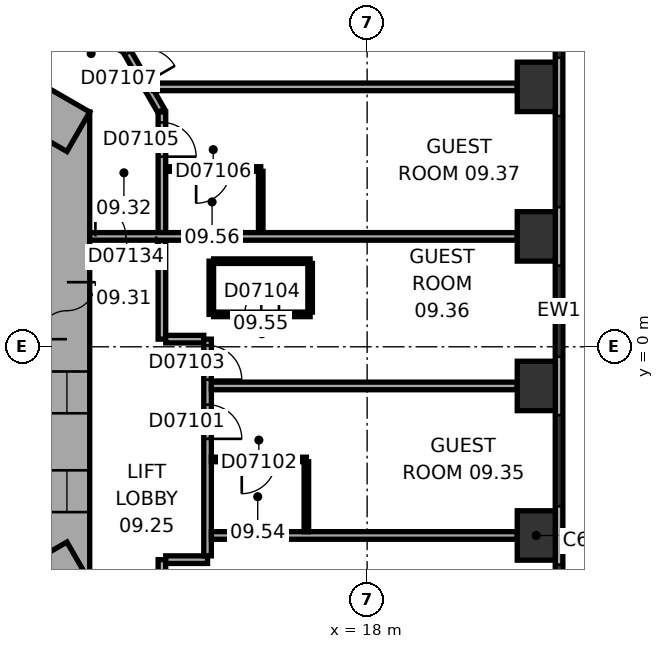
"""IFC4 building model, lengths in metres.
Left out: names, types, materials, properties, quantities, classifications, styles, units other than length and angle.
Written with IfcOpenShell. Run it as: python <this file> out.ifc"""

import sys

from ifc_helpers import new_model, si_unit, direction, frame, frame_2d, origin, origin_2d, place, context, subcontext, project, spatial, rectangle, extrude, element, fill, save


model = new_model("IFC4")
c1 = context("Model", 3, precision=1e-05, world=origin(), true_north=direction((0.0, 1.0)))
c2 = subcontext(c1, "Body", "Model", "MODEL_VIEW")
j1 = project(units=[si_unit("LENGTHUNIT", "METRE"), si_unit("PLANEANGLEUNIT", "RADIAN")], contexts=[c1])
p1 = place(None, origin())
s1 = spatial("IfcSite", under=j1, at=p1, CompositionType="ELEMENT")
p2 = place(p1, origin())
s2 = spatial("IfcBuilding", under=s1, at=p2, CompositionType="ELEMENT")
p3 = place(p2, frame((0.0, 0.0, 50.6)))
s3 = spatial("IfcBuildingStorey", under=s2, at=p3, CompositionType="ELEMENT", Elevation=50.6)
for number, where, z_axis, x_axis in (
    (1, (22.45, -4.965, 0.0), (0.0, 0.0, 1.0), (0.0, 1.0, 0.0)),
    (2, (22.45, -1.03, 0.0), (0.0, 0.0, 1.0), (0.0, 1.0, 0.0)),
    (3, (22.45, 2.905, 0.0), (0.0, 0.0, 1.0), (0.0, 1.0, 0.0)),
    (4, (22.45, 6.839, 0.0), (0.0, 0.0, 1.0), (0.0, 1.0, 0.0)),
):
    element("IfcColumn", number, at=place(p3, frame(where, z_axis=z_axis, x_axis=x_axis)), inside=s3, PredefinedType="COLUMN", context=c2, shape_type="SweptSolid", body=[
        extrude(rectangle(XDim=1.3, YDim=1.0, at=origin_2d()), origin(), (0.0, 0.0, 1.0), 3.3),
    ])
p4 = place(p3, frame((10.1, -6.177, 0.0), z_axis=(0.0, 0.0, 1.0), x_axis=(0.0, 1.0, 0.0)))
e5 = element("IfcWall", 5, at=p4, inside=s3, PredefinedType="SHEAR", context=c2, shape_type="SweptSolid", body=[
    extrude(rectangle(XDim=12.355, YDim=1.2, at=frame_2d((6.177, 0.0))), origin(), (0.0, 0.0, 1.0), 3.3),
])
p5 = place(p4, frame((6.378, 0.0, 0.0)))
e6 = element("IfcOpeningElement", 6, at=p5, cuts=e5, PredefinedType="OPENING", context=c2, shape_type="SweptSolid", body=[
    extrude(rectangle(XDim=1.5, YDim=2.1, at=frame_2d((0.75, 1.05))), frame((0.0, 0.61, 0.0), z_axis=(0.0, -1.0, 0.0), x_axis=(1.0, 0.0, 0.0)), (0.0, 0.0, 1.0), 1.22),
])
p6 = place(p4, frame((1.828, 0.0, 0.0)))
e7 = element("IfcOpeningElement", 7, at=p6, cuts=e5, PredefinedType="OPENING", context=c2, shape_type="SweptSolid", body=[
    extrude(rectangle(XDim=1.1, YDim=2.1, at=frame_2d((0.55, 1.05))), frame((0.0, 0.61, 0.0), z_axis=(0.0, -1.0, 0.0), x_axis=(1.0, 0.0, 0.0)), (0.0, 0.0, 1.0), 1.22),
])
p7 = place(p4, frame((4.427, 0.0, 0.0)))
e8 = element("IfcOpeningElement", 8, at=p7, cuts=e5, PredefinedType="OPENING", context=c2, shape_type="SweptSolid", body=[
    extrude(rectangle(XDim=1.1, YDim=2.1, at=frame_2d((0.55, 1.05))), frame((0.0, 0.61, 0.0), z_axis=(0.0, -1.0, 0.0), x_axis=(1.0, 0.0, 0.0)), (0.0, 0.0, 1.0), 1.22),
])
p8 = place(p3, frame((10.4, 5.658, 0.0), z_axis=(0.0, 0.0, 1.0), x_axis=(-0.866021384402, 0.500006961711, 0.0)))
e9 = element("IfcWall", 9, at=p8, inside=s3, PredefinedType="SHEAR", context=c2, shape_type="SweptSolid", body=[
    extrude(rectangle(XDim=12.355, YDim=1.2, at=frame_2d((6.178, 0.0))), origin(), (0.0, 0.0, 1.0), 3.3),
])
p9 = place(p8, frame((2.728, 0.0, 0.0)))
e10 = element("IfcOpeningElement", 10, at=p9, cuts=e9, PredefinedType="OPENING", context=c2, shape_type="SweptSolid", body=[
    extrude(rectangle(XDim=1.1, YDim=2.1, at=frame_2d((0.55, 1.05))), frame((0.0, 0.61, 0.0), z_axis=(0.0, -1.0, 0.0), x_axis=(1.0, 0.0, 0.0)), (0.0, 0.0, 1.0), 1.22),
])
p10 = place(p8, frame((5.328, 0.0, 0.0)))
e11 = element("IfcOpeningElement", 11, at=p10, cuts=e9, PredefinedType="OPENING", context=c2, shape_type="SweptSolid", body=[
    extrude(rectangle(XDim=1.1, YDim=2.1, at=frame_2d((0.55, 1.05))), frame((0.0, 0.61, 0.0), z_axis=(0.0, -1.0, 0.0), x_axis=(1.0, 0.0, 0.0)), (0.0, 0.0, 1.0), 1.22),
])
p11 = place(p8, frame((7.928, 0.0, 0.0)))
e12 = element("IfcOpeningElement", 12, at=p11, cuts=e9, PredefinedType="OPENING", context=c2, shape_type="SweptSolid", body=[
    extrude(rectangle(XDim=1.1, YDim=2.1, at=frame_2d((0.55, 1.05))), frame((0.0, 0.61, 0.0), z_axis=(0.0, -1.0, 0.0), x_axis=(1.0, 0.0, 0.0)), (0.0, 0.0, 1.0), 1.22),
])
p12 = place(p3, frame((-0.3, -11.836, 0.0), z_axis=(0.0, 0.0, 1.0), x_axis=(0.866021384402, 0.500006961711, 0.0)))
e13 = element("IfcWall", 13, at=p12, inside=s3, PredefinedType="SHEAR", context=c2, shape_type="SweptSolid", body=[
    extrude(rectangle(XDim=12.355, YDim=1.2, at=frame_2d((6.178, 0.0))), origin(), (0.0, 0.0, 1.0), 3.3),
])
p13 = place(p12, frame((2.828, 0.0, 0.0)))
e14 = element("IfcOpeningElement", 14, at=p13, cuts=e13, PredefinedType="OPENING", context=c2, shape_type="SweptSolid", body=[
    extrude(rectangle(XDim=0.9, YDim=2.1, at=frame_2d((0.45, 1.05))), frame((0.0, 0.61, 0.0), z_axis=(0.0, -1.0, 0.0), x_axis=(1.0, 0.0, 0.0)), (0.0, 0.0, 1.0), 1.22),
])
p14 = place(p12, frame((5.428, 0.0, 0.0)))
e15 = element("IfcOpeningElement", 15, at=p14, cuts=e13, PredefinedType="OPENING", context=c2, shape_type="SweptSolid", body=[
    extrude(rectangle(XDim=0.9, YDim=2.1, at=frame_2d((0.45, 1.05))), frame((0.0, 0.61, 0.0), z_axis=(0.0, -1.0, 0.0), x_axis=(1.0, 0.0, 0.0)), (0.0, 0.0, 1.0), 1.22),
])
p15 = place(p12, frame((7.928, 0.0, 0.0)))
e16 = element("IfcOpeningElement", 16, at=p15, cuts=e13, PredefinedType="OPENING", context=c2, shape_type="SweptSolid", body=[
    extrude(rectangle(XDim=1.1, YDim=2.1, at=frame_2d((0.55, 1.05))), frame((0.0, 0.61, 0.0), z_axis=(0.0, -1.0, 0.0), x_axis=(1.0, 0.0, 0.0)), (0.0, 0.0, 1.0), 1.22),
])
p16 = place(p3, frame((23.05, -9.687, 0.0), z_axis=(0.0, 0.0, 1.0), x_axis=(0.0, 1.0, 0.0)))
e17 = element("IfcWall", 17, at=p16, inside=s3, PredefinedType="STANDARD", context=c2, shape_type="SweptSolid", body=[
    extrude(rectangle(XDim=21.246, YDim=0.2, at=frame_2d((10.623, 0.0))), origin(), (0.0, 0.0, 1.0), 3.3),
])
p17 = place(p16, frame((1.555, 0.0, 0.8)))
e18 = element("IfcOpeningElement", 18, at=p17, cuts=e17, PredefinedType="OPENING", context=c2, shape_type="SweptSolid", body=[
    extrude(rectangle(XDim=2.4, YDim=1.7, at=frame_2d((1.2, 0.85))), frame((0.0, 0.11, 0.0), z_axis=(0.0, -1.0, 0.0), x_axis=(1.0, 0.0, 0.0)), (0.0, 0.0, 1.0), 0.22),
])
p18 = place(p16, frame((5.489, 0.0, 0.8)))
e19 = element("IfcOpeningElement", 19, at=p18, cuts=e17, PredefinedType="OPENING", context=c2, shape_type="SweptSolid", body=[
    extrude(rectangle(XDim=2.4, YDim=1.7, at=frame_2d((1.2, 0.85))), frame((0.0, 0.11, 0.0), z_axis=(0.0, -1.0, 0.0), x_axis=(1.0, 0.0, 0.0)), (0.0, 0.0, 1.0), 0.22),
])
p19 = place(p16, frame((9.424, 0.0, 0.8)))
e20 = element("IfcOpeningElement", 20, at=p19, cuts=e17, PredefinedType="OPENING", context=c2, shape_type="SweptSolid", body=[
    extrude(rectangle(XDim=2.4, YDim=1.7, at=frame_2d((1.2, 0.85))), frame((0.0, 0.11, 0.0), z_axis=(0.0, -1.0, 0.0), x_axis=(1.0, 0.0, 0.0)), (0.0, 0.0, 1.0), 0.22),
])
p20 = place(p16, frame((13.358, 0.0, 0.8)))
e21 = element("IfcOpeningElement", 21, at=p20, cuts=e17, PredefinedType="OPENING", context=c2, shape_type="SweptSolid", body=[
    extrude(rectangle(XDim=2.4, YDim=1.7, at=frame_2d((1.2, 0.85))), frame((0.0, 0.11, 0.0), z_axis=(0.0, -1.0, 0.0), x_axis=(1.0, 0.0, 0.0)), (0.0, 0.0, 1.0), 0.22),
])
p21 = place(p16, frame((17.293, 0.0, 0.8)))
e22 = element("IfcOpeningElement", 22, at=p21, cuts=e17, PredefinedType="OPENING", context=c2, shape_type="SweptSolid", body=[
    extrude(rectangle(XDim=2.4, YDim=1.7, at=frame_2d((1.2, 0.85))), frame((0.0, 0.11, 0.0), z_axis=(0.0, -1.0, 0.0), x_axis=(1.0, 0.0, 0.0)), (0.0, 0.0, 1.0), 0.22),
])
p22 = place(p3, frame((12.58, 6.212, 0.0), z_axis=(0.0, 0.0, 1.0), x_axis=(-0.500063286585, 0.865988862174, 0.0)))
e23 = element("IfcWall", 23, at=p22, inside=s3, PredefinedType="PARTITIONING", context=c2, shape_type="SweptSolid", body=[
    extrude(rectangle(XDim=1.86, YDim=0.2, at=frame_2d((0.93, 0.0))), origin(), (0.0, 0.0, 1.0), 3.05),
])
p23 = place(p22, frame((0.842, 0.0, 0.0)))
e24 = element("IfcOpeningElement", 24, at=p23, cuts=e23, PredefinedType="OPENING", context=c2, shape_type="SweptSolid", body=[
    extrude(rectangle(XDim=0.9, YDim=2.1, at=frame_2d((0.45, 1.05))), frame((0.0, 0.11, 0.0), z_axis=(0.0, -1.0, 0.0), x_axis=(1.0, 0.0, 0.0)), (0.0, 0.0, 1.0), 0.22),
])
p24 = place(p3, frame((12.6, -6.138, 0.0), z_axis=(0.0, 0.0, 1.0), x_axis=(0.0, 1.0, 0.0)))
e25 = element("IfcWall", 25, at=p24, inside=s3, PredefinedType="PARTITIONING", context=c2, shape_type="SweptSolid", body=[
    extrude(rectangle(XDim=0.537, YDim=0.2, at=frame_2d((0.268, 0.0))), origin(), (0.0, 0.0, 1.0), 3.05),
])
p25 = place(p3, frame((12.6, 0.201, 0.0), z_axis=(0.0, 0.0, 1.0), x_axis=(0.0, 1.0, 0.0)))
e26 = element("IfcWall", 26, at=p25, inside=s3, PredefinedType="PARTITIONING", context=c2, shape_type="SweptSolid", body=[
    extrude(rectangle(XDim=2.604, YDim=0.2, at=frame_2d((1.302, 0.0))), origin(), (0.0, 0.0, 1.0), 3.05),
])
p26 = place(p3, frame((12.6, 3.004, 0.0), z_axis=(0.0, 0.0, 1.0), x_axis=(0.0, 1.0, 0.0)))
e27 = element("IfcWall", 27, at=p26, inside=s3, PredefinedType="PARTITIONING", context=c2, shape_type="SweptSolid", body=[
    extrude(rectangle(XDim=3.173, YDim=0.2, at=frame_2d((1.586, 0.0))), origin(), (0.0, 0.0, 1.0), 3.05),
])
p27 = place(p26, frame((1.998, 0.0, 0.0)))
e28 = element("IfcOpeningElement", 28, at=p27, cuts=e27, PredefinedType="OPENING", context=c2, shape_type="SweptSolid", body=[
    extrude(rectangle(XDim=0.9, YDim=2.1, at=frame_2d((0.45, 1.05))), frame((0.0, 0.11, 0.0), z_axis=(0.0, -1.0, 0.0), x_axis=(1.0, 0.0, 0.0)), (0.0, 0.0, 1.0), 0.22),
])
p28 = place(p3, frame((12.7, -5.601, 0.0), z_axis=(0.0, 0.0, 1.0), x_axis=(1.0, 0.0, 0.0)))
e29 = element("IfcWall", 29, at=p28, inside=s3, PredefinedType="PARTITIONING", context=c2, shape_type="SweptSolid", body=[
    extrude(rectangle(XDim=1.101, YDim=0.2, at=frame_2d((0.551, 0.0))), origin(), (0.0, 0.0, 1.0), 3.05),
])
p29 = place(p3, frame((12.7, 4.677, 0.0), z_axis=(0.0, 0.0, 1.0), x_axis=(1.0, 0.0, 0.0)))
e30 = element("IfcWall", 30, at=p29, inside=s3, PredefinedType="PARTITIONING", context=c2, shape_type="SweptSolid", body=[
    extrude(rectangle(XDim=2.5, YDim=0.12, at=frame_2d((1.25, 0.0))), origin(), (0.0, 0.0, 1.0), 3.05),
])
p30 = place(p29, frame((0.8, 0.0, 0.0)))
e31 = element("IfcOpeningElement", 31, at=p30, cuts=e30, PredefinedType="OPENING", context=c2, shape_type="SweptSolid", body=[
    extrude(rectangle(XDim=0.9, YDim=2.1, at=frame_2d((0.45, 1.05))), frame((0.0, 0.07, 0.0), z_axis=(0.0, -1.0, 0.0), x_axis=(1.0, 0.0, 0.0)), (0.0, 0.0, 1.0), 0.14),
])
p31 = place(p3, frame((13.701, 0.201, 0.0), z_axis=(0.0, 0.0, 1.0), x_axis=(-1.0, 0.0, 0.0)))
e32 = element("IfcWall", 32, at=p31, inside=s3, PredefinedType="PARTITIONING", context=c2, shape_type="SweptSolid", body=[
    extrude(rectangle(XDim=1.001, YDim=0.2, at=frame_2d((0.5, 0.0))), origin(), (0.0, 0.0, 1.0), 3.05),
])
p32 = place(p3, frame((13.801, -5.501, 0.0), z_axis=(0.0, 0.0, 1.0), x_axis=(0.0, 1.0, 0.0)))
e33 = element("IfcWall", 33, at=p32, inside=s3, PredefinedType="PARTITIONING", context=c2, shape_type="SweptSolid", body=[
    extrude(rectangle(XDim=5.702, YDim=0.2, at=frame_2d((2.851, 0.0))), origin(), (0.0, 0.0, 1.0), 3.05),
])
p33 = place(p32, frame((3.079, 0.0, 0.0)))
e34 = element("IfcOpeningElement", 34, at=p33, cuts=e33, PredefinedType="OPENING", context=c2, shape_type="SweptSolid", body=[
    extrude(rectangle(XDim=0.9, YDim=2.1, at=frame_2d((0.45, 1.05))), frame((0.0, 0.11, 0.0), z_axis=(0.0, -1.0, 0.0), x_axis=(1.0, 0.0, 0.0)), (0.0, 0.0, 1.0), 0.22),
])
p34 = place(p32, frame((4.636, 0.0, 0.0)))
e35 = element("IfcOpeningElement", 35, at=p34, cuts=e33, PredefinedType="OPENING", context=c2, shape_type="SweptSolid", body=[
    extrude(rectangle(XDim=0.9, YDim=2.1, at=frame_2d((0.45, 1.05))), frame((0.0, 0.11, 0.0), z_axis=(0.0, -1.0, 0.0), x_axis=(1.0, 0.0, 0.0)), (0.0, 0.0, 1.0), 0.22),
])
p35 = place(p3, frame((13.901, -4.965, 0.0), z_axis=(0.0, 0.0, 1.0), x_axis=(1.0, 0.0, 0.0)))
e36 = element("IfcWall", 36, at=p35, inside=s3, PredefinedType="PARTITIONING", context=c2, shape_type="SweptSolid", body=[
    extrude(rectangle(XDim=8.049, YDim=0.2, at=frame_2d((4.024, 0.0))), origin(), (0.0, 0.0, 1.0), 3.05),
])
p36 = place(p3, frame((13.901, -2.965, 0.0), z_axis=(0.0, 0.0, 1.0), x_axis=(1.0, 0.0, 0.0)))
e37 = element("IfcWall", 37, at=p36, inside=s3, PredefinedType="PARTITIONING", context=c2, shape_type="SweptSolid", body=[
    extrude(rectangle(XDim=2.5, YDim=0.12, at=frame_2d((1.25, 0.0))), origin(), (0.0, 0.0, 1.0), 3.05),
])
p37 = place(p36, frame((0.8, 0.0, 0.0)))
e38 = element("IfcOpeningElement", 38, at=p37, cuts=e37, PredefinedType="OPENING", context=c2, shape_type="SweptSolid", body=[
    extrude(rectangle(XDim=0.9, YDim=2.1, at=frame_2d((0.45, 1.05))), frame((0.0, 0.07, 0.0), z_axis=(0.0, -1.0, 0.0), x_axis=(1.0, 0.0, 0.0)), (0.0, 0.0, 1.0), 0.14),
])
p38 = place(p3, frame((13.9, 0.853, 0.0), z_axis=(0.0, 0.0, 1.0), x_axis=(0.0, 1.0, 0.0)))
e39 = element("IfcWall", 39, at=p38, inside=s3, PredefinedType="PARTITIONING", context=c2, shape_type="SweptSolid", body=[
    extrude(rectangle(XDim=1.4, YDim=0.12, at=frame_2d((0.7, 0.0))), origin(), (0.0, 0.0, 1.0), 3.05),
])
p39 = place(p3, frame((13.96, 2.253, 0.0), z_axis=(0.0, 0.0, 1.0), x_axis=(1.0, 0.0, 0.0)))
e40 = element("IfcWall", 40, at=p39, inside=s3, PredefinedType="PARTITIONING", context=c2, shape_type="SweptSolid", body=[
    extrude(rectangle(XDim=2.54, YDim=0.12, at=frame_2d((1.27, 0.0))), origin(), (0.0, 0.0, 1.0), 3.05),
])
p40 = place(p3, frame((15.2, 4.618, 0.0), z_axis=(0.0, 0.0, 1.0), x_axis=(0.0, -1.0, 0.0)))
e41 = element("IfcWall", 41, at=p40, inside=s3, PredefinedType="PARTITIONING", context=c2, shape_type="SweptSolid", body=[
    extrude(rectangle(XDim=1.613, YDim=0.12, at=frame_2d((0.807, 0.0))), origin(), (0.0, 0.0, 1.0), 3.05),
])
p41 = place(p3, frame((16.401, -3.025, 0.0), z_axis=(0.0, 0.0, 1.0), x_axis=(0.0, -1.0, 0.0)))
e42 = element("IfcWall", 42, at=p41, inside=s3, PredefinedType="PARTITIONING", context=c2, shape_type="SweptSolid", body=[
    extrude(rectangle(XDim=1.84, YDim=0.12, at=frame_2d((0.92, 0.0))), origin(), (0.0, 0.0, 1.0), 3.05),
])
p42 = place(p3, frame((16.5, 0.853, 0.0), z_axis=(0.0, 0.0, 1.0), x_axis=(-1.0, 0.0, 0.0)))
e43 = element("IfcWall", 43, at=p42, inside=s3, PredefinedType="PARTITIONING", context=c2, shape_type="SweptSolid", body=[
    extrude(rectangle(XDim=2.54, YDim=0.12, at=frame_2d((1.27, 0.0))), origin(), (0.0, 0.0, 1.0), 3.05),
])
p43 = place(p42, frame((0.82, 0.0, 0.0)))
e44 = element("IfcOpeningElement", 44, at=p43, cuts=e43, PredefinedType="OPENING", context=c2, shape_type="SweptSolid", body=[
    extrude(rectangle(XDim=0.9, YDim=2.1, at=frame_2d((0.45, 1.05))), frame((0.0, 0.07, 0.0), z_axis=(0.0, -1.0, 0.0), x_axis=(1.0, 0.0, 0.0)), (0.0, 0.0, 1.0), 0.14),
])
p44 = place(p3, frame((16.5, 2.193, 0.0), z_axis=(0.0, 0.0, 1.0), x_axis=(0.0, -1.0, 0.0)))
e45 = element("IfcWall", 45, at=p44, inside=s3, PredefinedType="PARTITIONING", context=c2, shape_type="SweptSolid", body=[
    extrude(rectangle(XDim=1.28, YDim=0.12, at=frame_2d((0.64, 0.0))), origin(), (0.0, 0.0, 1.0), 3.05),
])
p45 = place(p3, frame((21.95, -1.03, 0.0), z_axis=(0.0, 0.0, 1.0), x_axis=(-1.0, 0.0, 0.0)))
e46 = element("IfcWall", 46, at=p45, inside=s3, PredefinedType="PARTITIONING", context=c2, shape_type="SweptSolid", body=[
    extrude(rectangle(XDim=8.049, YDim=0.2, at=frame_2d((4.024, 0.0))), origin(), (0.0, 0.0, 1.0), 2.6),
])
p46 = place(p3, frame((21.95, 2.905, 0.0), z_axis=(0.0, 0.0, 1.0), x_axis=(-1.0, 0.0, 0.0)))
e47 = element("IfcWall", 47, at=p46, inside=s3, PredefinedType="PARTITIONING", context=c2, shape_type="SweptSolid", body=[
    extrude(rectangle(XDim=11.25, YDim=0.2, at=frame_2d((5.625, 0.0))), origin(), (0.0, 0.0, 1.0), 3.05),
])
p47 = place(p46, frame((9.5, 0.0, 0.0)))
e48 = element("IfcOpeningElement", 48, at=p47, cuts=e47, PredefinedType="OPENING", context=c2, shape_type="SweptSolid", body=[
    extrude(rectangle(XDim=1.6, YDim=2.1, at=frame_2d((0.8, 1.05))), frame((0.0, 0.11, 0.0), z_axis=(0.0, -1.0, 0.0), x_axis=(1.0, 0.0, 0.0)), (0.0, 0.0, 1.0), 0.22),
])
p48 = place(p3, frame((21.95, 6.839, 0.0), z_axis=(0.0, 0.0, 1.0), x_axis=(-1.0, 0.0, 0.0)))
e49 = element("IfcWall", 49, at=p48, inside=s3, PredefinedType="PARTITIONING", context=c2, shape_type="SweptSolid", body=[
    extrude(rectangle(XDim=9.572, YDim=0.2, at=frame_2d((4.786, 0.0))), origin(), (0.0, 0.0, 1.0), 3.05),
])
p49 = place(p17, origin())
e50 = element("IfcWindow", 50, at=p49, inside=s3, PartitioningType="SINGLE_PANEL", PredefinedType="WINDOW", context=c2, shape_type="SweptSolid", body=[
    extrude(rectangle(XDim=2.4, YDim=1.7, at=frame_2d((1.2, 0.85))), frame((0.0, 0.03, 0.0), z_axis=(0.0, -1.0, 0.0), x_axis=(1.0, 0.0, 0.0)), (0.0, 0.0, 1.0), 0.06),
])
fill(e18, e50)
p50 = place(p18, origin())
e51 = element("IfcWindow", 51, at=p50, inside=s3, PartitioningType="SINGLE_PANEL", PredefinedType="WINDOW", context=c2, shape_type="SweptSolid", body=[
    extrude(rectangle(XDim=2.4, YDim=1.7, at=frame_2d((1.2, 0.85))), frame((0.0, 0.03, 0.0), z_axis=(0.0, -1.0, 0.0), x_axis=(1.0, 0.0, 0.0)), (0.0, 0.0, 1.0), 0.06),
])
fill(e19, e51)
p51 = place(p19, origin())
e52 = element("IfcWindow", 52, at=p51, inside=s3, PartitioningType="SINGLE_PANEL", PredefinedType="WINDOW", context=c2, shape_type="SweptSolid", body=[
    extrude(rectangle(XDim=2.4, YDim=1.7, at=frame_2d((1.2, 0.85))), frame((0.0, 0.03, 0.0), z_axis=(0.0, -1.0, 0.0), x_axis=(1.0, 0.0, 0.0)), (0.0, 0.0, 1.0), 0.06),
])
fill(e20, e52)
p52 = place(p20, origin())
e53 = element("IfcWindow", 53, at=p52, inside=s3, PartitioningType="SINGLE_PANEL", PredefinedType="WINDOW", context=c2, shape_type="SweptSolid", body=[
    extrude(rectangle(XDim=2.4, YDim=1.7, at=frame_2d((1.2, 0.85))), frame((0.0, 0.03, 0.0), z_axis=(0.0, -1.0, 0.0), x_axis=(1.0, 0.0, 0.0)), (0.0, 0.0, 1.0), 0.06),
])
fill(e21, e53)
p53 = place(p21, origin())
e54 = element("IfcWindow", 54, at=p53, inside=s3, PartitioningType="SINGLE_PANEL", PredefinedType="WINDOW", context=c2, shape_type="SweptSolid", body=[
    extrude(rectangle(XDim=2.4, YDim=1.7, at=frame_2d((1.2, 0.85))), frame((0.0, 0.03, 0.0), z_axis=(0.0, -1.0, 0.0), x_axis=(1.0, 0.0, 0.0)), (0.0, 0.0, 1.0), 0.06),
])
fill(e22, e54)
p54 = place(p5, origin())
e55 = element("IfcDoor", 55, at=p54, inside=s3, OperationType="DOUBLE_DOOR_SINGLE_SWING", PredefinedType="DOOR", context=c2, shape_type="SweptSolid", body=[
    extrude(rectangle(XDim=1.5, YDim=2.1, at=frame_2d((0.75, 1.05))), frame((0.0, 0.025, 0.0), z_axis=(0.0, -1.0, 0.0), x_axis=(1.0, 0.0, 0.0)), (0.0, 0.0, 1.0), 0.05),
])
fill(e6, e55)
p55 = place(p6, origin())
e56 = element("IfcDoor", 56, at=p55, inside=s3, OperationType="DOUBLE_DOOR_SLIDING", PredefinedType="DOOR", context=c2, shape_type="SweptSolid", body=[
    extrude(rectangle(XDim=1.1, YDim=2.1, at=frame_2d((0.55, 1.05))), frame((0.0, 0.025, 0.0), z_axis=(0.0, -1.0, 0.0), x_axis=(1.0, 0.0, 0.0)), (0.0, 0.0, 1.0), 0.05),
])
fill(e7, e56)
p56 = place(p7, origin())
e57 = element("IfcDoor", 57, at=p56, inside=s3, OperationType="DOUBLE_DOOR_SLIDING", PredefinedType="DOOR", context=c2, shape_type="SweptSolid", body=[
    extrude(rectangle(XDim=1.1, YDim=2.1, at=frame_2d((0.55, 1.05))), frame((0.0, 0.025, 0.0), z_axis=(0.0, -1.0, 0.0), x_axis=(1.0, 0.0, 0.0)), (0.0, 0.0, 1.0), 0.05),
])
fill(e8, e57)
p57 = place(p33, origin())
e58 = element("IfcDoor", 58, at=p57, inside=s3, OperationType="SINGLE_SWING_LEFT", PredefinedType="DOOR", context=c2, shape_type="SweptSolid", body=[
    extrude(rectangle(XDim=0.9, YDim=2.1, at=frame_2d((0.45, 1.05))), frame((0.0, 0.025, 0.0), z_axis=(0.0, -1.0, 0.0), x_axis=(1.0, 0.0, 0.0)), (0.0, 0.0, 1.0), 0.05),
])
fill(e34, e58)
p58 = place(p37, origin())
e59 = element("IfcDoor", 59, at=p58, inside=s3, OperationType="SINGLE_SWING_LEFT", PredefinedType="DOOR", context=c2, shape_type="SweptSolid", body=[
    extrude(rectangle(XDim=0.9, YDim=2.1, at=frame_2d((0.45, 1.05))), frame((0.0, 0.025, 0.0), z_axis=(0.0, -1.0, 0.0), x_axis=(1.0, 0.0, 0.0)), (0.0, 0.0, 1.0), 0.05),
])
fill(e38, e59)
p59 = place(p34, origin())
e60 = element("IfcDoor", 60, at=p59, inside=s3, OperationType="SINGLE_SWING_LEFT", PredefinedType="DOOR", context=c2, shape_type="SweptSolid", body=[
    extrude(rectangle(XDim=0.9, YDim=2.1, at=frame_2d((0.45, 1.05))), frame((0.0, 0.025, 0.0), z_axis=(0.0, -1.0, 0.0), x_axis=(1.0, 0.0, 0.0)), (0.0, 0.0, 1.0), 0.05),
])
fill(e35, e60)
p60 = place(p43, origin())
e61 = element("IfcDoor", 61, at=p60, inside=s3, OperationType="SINGLE_SWING_LEFT", PredefinedType="DOOR", context=c2, shape_type="SweptSolid", body=[
    extrude(rectangle(XDim=0.9, YDim=2.1, at=frame_2d((0.45, 1.05))), frame((0.0, 0.025, 0.0), z_axis=(0.0, -1.0, 0.0), x_axis=(1.0, 0.0, 0.0)), (0.0, 0.0, 1.0), 0.05),
])
fill(e44, e61)
p61 = place(p27, origin())
e62 = element("IfcDoor", 62, at=p61, inside=s3, OperationType="SINGLE_SWING_LEFT", PredefinedType="DOOR", context=c2, shape_type="SweptSolid", body=[
    extrude(rectangle(XDim=0.9, YDim=2.1, at=frame_2d((0.45, 1.05))), frame((0.0, 0.025, 0.0), z_axis=(0.0, -1.0, 0.0), x_axis=(1.0, 0.0, 0.0)), (0.0, 0.0, 1.0), 0.05),
])
fill(e28, e62)
p62 = place(p30, origin())
e63 = element("IfcDoor", 63, at=p62, inside=s3, OperationType="SINGLE_SWING_LEFT", PredefinedType="DOOR", context=c2, shape_type="SweptSolid", body=[
    extrude(rectangle(XDim=0.9, YDim=2.1, at=frame_2d((0.45, 1.05))), frame((0.0, 0.025, 0.0), z_axis=(0.0, -1.0, 0.0), x_axis=(1.0, 0.0, 0.0)), (0.0, 0.0, 1.0), 0.05),
])
fill(e31, e63)
p63 = place(p23, origin())
e64 = element("IfcDoor", 64, at=p63, inside=s3, OperationType="SINGLE_SWING_LEFT", PredefinedType="DOOR", context=c2, shape_type="SweptSolid", body=[
    extrude(rectangle(XDim=0.9, YDim=2.1, at=frame_2d((0.45, 1.05))), frame((0.0, 0.025, 0.0), z_axis=(0.0, -1.0, 0.0), x_axis=(1.0, 0.0, 0.0)), (0.0, 0.0, 1.0), 0.05),
])
fill(e24, e64)
p64 = place(p47, origin())
e65 = element("IfcDoor", 65, at=p64, inside=s3, OperationType="DOUBLE_DOOR_SINGLE_SWING", PredefinedType="DOOR", context=c2, shape_type="SweptSolid", body=[
    extrude(rectangle(XDim=1.6, YDim=2.1, at=frame_2d((0.8, 1.05))), frame((0.0, 0.025, 0.0), z_axis=(0.0, -1.0, 0.0), x_axis=(1.0, 0.0, 0.0)), (0.0, 0.0, 1.0), 0.05),
])
fill(e48, e65)
save(model, sys.argv[1])
